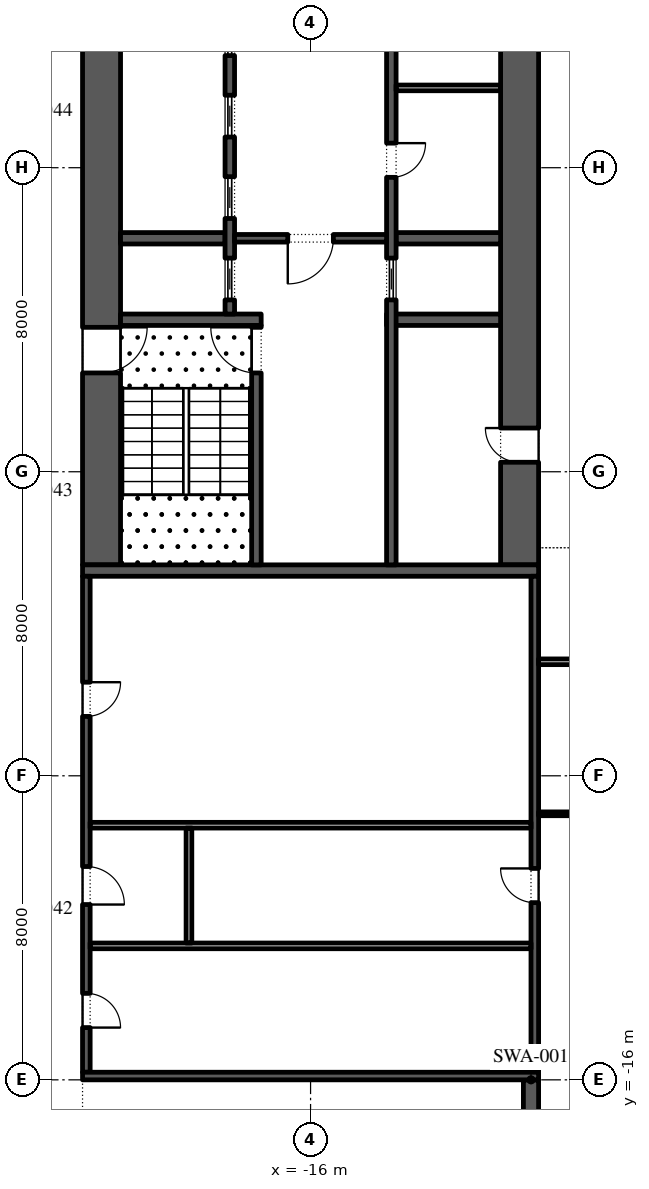
"""IFC4 building model, lengths in metres.
Left out: names, types, materials, properties, quantities, classifications, styles, units other than length and angle.
Written with IfcOpenShell. Run it as: python <this file> out.ifc"""

import sys

from ifc_helpers import new_model, si_unit, direction, frame, frame_2d, origin, place, context, subcontext, project, spatial, rectangle, extrude, element, fill, save


model = new_model("IFC4")
c1 = context("Model", 3, precision=1e-05, world=origin(), true_north=direction((0.0, 1.0)))
c2 = subcontext(c1, "Body", "Model", "MODEL_VIEW")
j1 = project(units=[si_unit("LENGTHUNIT", "METRE"), si_unit("PLANEANGLEUNIT", "RADIAN")], contexts=[c1])
p1 = place(None, origin())
s1 = spatial("IfcSite", under=j1, at=p1, CompositionType="ELEMENT")
p2 = place(p1, origin())
s2 = spatial("IfcBuilding", under=s1, at=p2, CompositionType="ELEMENT")
p3 = place(p2, frame((0.0, 0.0, 14.0)))
s3 = spatial("IfcBuildingStorey", under=s2, at=p3, CompositionType="ELEMENT", Elevation=14.0)
p4 = place(p3, frame((-10.2, -31.0, 0.0), z_axis=(0.0, 0.0, 1.0), x_axis=(0.0, 1.0, 0.0)))
e1 = element("IfcWall", 1, at=p4, inside=s3, PredefinedType="SHEAR", context=c2, shape_type="SweptSolid", body=[
    extrude(rectangle(XDim=15.0, YDim=0.4, at=frame_2d((7.5, 0.0))), origin(), (0.0, 0.0, 1.0), 4.9),
])
p5 = place(p3, frame((-21.5, -2.45, 0.0), z_axis=(0.0, 0.0, 1.0), x_axis=(0.0, 1.0, 0.0)))
e2 = element("IfcWall", 2, at=p5, inside=s3, PredefinedType="SHEAR", context=c2, shape_type="SweptSolid", body=[
    extrude(rectangle(XDim=27.9, YDim=1.0, at=frame_2d((13.95, 0.0))), origin(), (0.0, 0.0, 1.0), 4.9),
])
p6 = place(p5, frame((5.05, 0.0, 0.0)))
e3 = element("IfcOpeningElement", 3, at=p6, cuts=e2, PredefinedType="OPENING", context=c2, shape_type="SweptSolid", body=[
    extrude(rectangle(XDim=1.2, YDim=2.1, at=frame_2d((0.6, 1.05))), frame((0.0, 0.51, 0.0), z_axis=(0.0, -1.0, 0.0), x_axis=(1.0, 0.0, 0.0)), (0.0, 0.0, 1.0), 1.02),
])
p7 = place(p5, frame((21.65, 0.0, 0.0)))
e4 = element("IfcOpeningElement", 4, at=p7, cuts=e2, PredefinedType="OPENING", context=c2, shape_type="SweptSolid", body=[
    extrude(rectangle(XDim=1.2, YDim=2.1, at=frame_2d((0.6, 1.05))), frame((0.0, 0.51, 0.0), z_axis=(0.0, -1.0, 0.0), x_axis=(1.0, 0.0, 0.0)), (0.0, 0.0, 1.0), 1.02),
])
p8 = place(p3, frame((-10.5, -2.45, 0.0), z_axis=(0.0, 0.0, 1.0), x_axis=(0.0, 1.0, 0.0)))
e5 = element("IfcWall", 5, at=p8, inside=s3, PredefinedType="SHEAR", context=c2, shape_type="SweptSolid", body=[
    extrude(rectangle(XDim=27.9, YDim=1.0, at=frame_2d((13.95, 0.0))), origin(), (0.0, 0.0, 1.0), 4.9),
])
p9 = place(p8, frame((23.65, 0.0, 0.0)))
e6 = element("IfcOpeningElement", 6, at=p9, cuts=e5, PredefinedType="OPENING", context=c2, shape_type="SweptSolid", body=[
    extrude(rectangle(XDim=2.4, YDim=2.1, at=frame_2d((1.2, 1.05))), frame((0.0, 0.51, 0.0), z_axis=(0.0, -1.0, 0.0), x_axis=(1.0, 0.0, 0.0)), (0.0, 0.0, 1.0), 1.02),
])
p10 = place(p8, frame((2.7, 0.0, 0.0)))
e7 = element("IfcOpeningElement", 7, at=p10, cuts=e5, PredefinedType="OPENING", context=c2, shape_type="SweptSolid", body=[
    extrude(rectangle(XDim=0.9, YDim=2.1, at=frame_2d((0.45, 1.05))), frame((0.0, 0.51, 0.0), z_axis=(0.0, -1.0, 0.0), x_axis=(1.0, 0.0, 0.0)), (0.0, 0.0, 1.0), 1.02),
])
p11 = place(p3, frame((-22.0, -2.6, 0.0), z_axis=(0.0, 0.0, 1.0), x_axis=(1.0, 0.0, 0.0)))
e8 = element("IfcWall", 8, at=p11, inside=s3, PredefinedType="SHEAR", context=c2, shape_type="SweptSolid", body=[
    extrude(rectangle(XDim=12.0, YDim=0.3, at=frame_2d((6.0, 0.0))), origin(), (0.0, 0.0, 1.0), 4.9),
])
p12 = place(p3, frame((-21.0, 4.0, 0.0), z_axis=(0.0, 0.0, 1.0), x_axis=(1.0, 0.0, 0.0)))
e9 = element("IfcWall", 9, at=p12, inside=s3, PredefinedType="SHEAR", context=c2, shape_type="SweptSolid", body=[
    extrude(rectangle(XDim=3.7, YDim=0.3, at=frame_2d((1.85, 0.0))), origin(), (0.0, 0.0, 1.0), 4.9),
])
p13 = place(p3, frame((-17.425, -2.45, 0.0), z_axis=(0.0, 0.0, 1.0), x_axis=(0.0, 1.0, 0.0)))
e10 = element("IfcWall", 10, at=p13, inside=s3, PredefinedType="SHEAR", context=c2, shape_type="SweptSolid", body=[
    extrude(rectangle(XDim=6.3, YDim=0.25, at=frame_2d((3.15, 0.0))), origin(), (0.0, 0.0, 1.0), 4.9),
])
p14 = place(p13, frame((5.05, 0.0, 0.0)))
e11 = element("IfcOpeningElement", 11, at=p14, cuts=e10, PredefinedType="OPENING", context=c2, shape_type="SweptSolid", body=[
    extrude(rectangle(XDim=1.2, YDim=2.1, at=frame_2d((0.6, 1.05))), frame((0.0, 0.135, 0.0), z_axis=(0.0, -1.0, 0.0), x_axis=(1.0, 0.0, 0.0)), (0.0, 0.0, 1.0), 0.27),
])
p15 = place(p3, frame((-21.0, 6.143, 0.0), z_axis=(0.0, 0.0, 1.0), x_axis=(1.0, 0.0, 0.0)))
e12 = element("IfcWall", 12, at=p15, inside=s3, PredefinedType="SHEAR", context=c2, shape_type="SweptSolid", body=[
    extrude(rectangle(XDim=2.75, YDim=0.3, at=frame_2d((1.375, 0.0))), origin(), (0.0, 0.0, 1.0), 4.9),
])
p16 = place(p3, frame((-18.125, 4.15, 0.0), z_axis=(0.0, 0.0, 1.0), x_axis=(0.0, 1.0, 0.0)))
e13 = element("IfcWall", 13, at=p16, inside=s3, PredefinedType="SHEAR", context=c2, shape_type="SweptSolid", body=[
    extrude(rectangle(XDim=14.7, YDim=0.25, at=frame_2d((7.35, 0.0))), origin(), (0.0, 0.0, 1.0), 4.9),
])
p17 = place(p16, frame((0.371, 0.0, 0.0)))
e14 = element("IfcOpeningElement", 14, at=p17, cuts=e13, PredefinedType="OPENING", context=c2, shape_type="SweptSolid", body=[
    extrude(rectangle(XDim=1.1, YDim=2.1, at=frame_2d((0.55, 1.05))), frame((0.0, 0.135, 0.0), z_axis=(0.0, -1.0, 0.0), x_axis=(1.0, 0.0, 0.0)), (0.0, 0.0, 1.0), 0.27),
])
p18 = place(p16, frame((2.514, 0.0, 0.0)))
e15 = element("IfcOpeningElement", 15, at=p18, cuts=e13, PredefinedType="OPENING", context=c2, shape_type="SweptSolid", body=[
    extrude(rectangle(XDim=1.1, YDim=2.1, at=frame_2d((0.55, 1.05))), frame((0.0, 0.135, 0.0), z_axis=(0.0, -1.0, 0.0), x_axis=(1.0, 0.0, 0.0)), (0.0, 0.0, 1.0), 0.27),
])
p19 = place(p16, frame((4.657, 0.0, 0.0)))
e16 = element("IfcOpeningElement", 16, at=p19, cuts=e13, PredefinedType="OPENING", context=c2, shape_type="SweptSolid", body=[
    extrude(rectangle(XDim=1.1, YDim=2.1, at=frame_2d((0.55, 1.05))), frame((0.0, 0.135, 0.0), z_axis=(0.0, -1.0, 0.0), x_axis=(1.0, 0.0, 0.0)), (0.0, 0.0, 1.0), 0.27),
])
p20 = place(p16, frame((6.8, 0.0, 0.0)))
e17 = element("IfcOpeningElement", 17, at=p20, cuts=e13, PredefinedType="OPENING", context=c2, shape_type="SweptSolid", body=[
    extrude(rectangle(XDim=1.1, YDim=2.1, at=frame_2d((0.55, 1.05))), frame((0.0, 0.135, 0.0), z_axis=(0.0, -1.0, 0.0), x_axis=(1.0, 0.0, 0.0)), (0.0, 0.0, 1.0), 0.27),
])
p21 = place(p16, frame((8.943, 0.0, 0.0)))
e18 = element("IfcOpeningElement", 18, at=p21, cuts=e13, PredefinedType="OPENING", context=c2, shape_type="SweptSolid", body=[
    extrude(rectangle(XDim=1.1, YDim=2.1, at=frame_2d((0.55, 1.05))), frame((0.0, 0.135, 0.0), z_axis=(0.0, -1.0, 0.0), x_axis=(1.0, 0.0, 0.0)), (0.0, 0.0, 1.0), 0.27),
])
p22 = place(p16, frame((11.086, 0.0, 0.0)))
e19 = element("IfcOpeningElement", 19, at=p22, cuts=e13, PredefinedType="OPENING", context=c2, shape_type="SweptSolid", body=[
    extrude(rectangle(XDim=1.1, YDim=2.1, at=frame_2d((0.55, 1.05))), frame((0.0, 0.135, 0.0), z_axis=(0.0, -1.0, 0.0), x_axis=(1.0, 0.0, 0.0)), (0.0, 0.0, 1.0), 0.27),
])
p23 = place(p16, frame((13.229, 0.0, 0.0)))
e20 = element("IfcOpeningElement", 20, at=p23, cuts=e13, PredefinedType="OPENING", context=c2, shape_type="SweptSolid", body=[
    extrude(rectangle(XDim=1.1, YDim=2.1, at=frame_2d((0.55, 1.05))), frame((0.0, 0.135, 0.0), z_axis=(0.0, -1.0, 0.0), x_axis=(1.0, 0.0, 0.0)), (0.0, 0.0, 1.0), 0.27),
])
p24 = place(p3, frame((-14.0, 4.0, 0.0), z_axis=(0.0, 0.0, 1.0), x_axis=(1.0, 0.0, 0.0)))
e21 = element("IfcWall", 21, at=p24, inside=s3, PredefinedType="SHEAR", context=c2, shape_type="SweptSolid", body=[
    extrude(rectangle(XDim=3.0, YDim=0.3, at=frame_2d((1.5, 0.0))), origin(), (0.0, 0.0, 1.0), 4.9),
])
p25 = place(p3, frame((-13.75, 6.143, 0.0), z_axis=(0.0, 0.0, 1.0), x_axis=(1.0, 0.0, 0.0)))
e22 = element("IfcWall", 22, at=p25, inside=s3, PredefinedType="SHEAR", context=c2, shape_type="SweptSolid", body=[
    extrude(rectangle(XDim=2.75, YDim=0.3, at=frame_2d((1.375, 0.0))), origin(), (0.0, 0.0, 1.0), 4.9),
])
p26 = place(p3, frame((-13.875, -2.45, 0.0), z_axis=(0.0, 0.0, 1.0), x_axis=(0.0, 1.0, 0.0)))
e23 = element("IfcWall", 23, at=p26, inside=s3, PredefinedType="SHEAR", context=c2, shape_type="SweptSolid", body=[
    extrude(rectangle(XDim=21.3, YDim=0.25, at=frame_2d((10.65, 0.0))), origin(), (0.0, 0.0, 1.0), 4.9),
])
p27 = place(p26, frame((10.196, 0.0, 0.0)))
e24 = element("IfcOpeningElement", 24, at=p27, cuts=e23, PredefinedType="OPENING", context=c2, shape_type="SweptSolid", body=[
    extrude(rectangle(XDim=0.9, YDim=2.1, at=frame_2d((0.45, 1.05))), frame((0.0, 0.135, 0.0), z_axis=(0.0, -1.0, 0.0), x_axis=(1.0, 0.0, 0.0)), (0.0, 0.0, 1.0), 0.27),
])
p28 = place(p26, frame((16.475, 0.0, 0.0)))
e25 = element("IfcOpeningElement", 25, at=p28, cuts=e23, PredefinedType="OPENING", context=c2, shape_type="SweptSolid", body=[
    extrude(rectangle(XDim=0.9, YDim=2.1, at=frame_2d((0.45, 1.05))), frame((0.0, 0.135, 0.0), z_axis=(0.0, -1.0, 0.0), x_axis=(1.0, 0.0, 0.0)), (0.0, 0.0, 1.0), 0.27),
])
p29 = place(p26, frame((6.971, 0.0, 0.0)))
e26 = element("IfcOpeningElement", 26, at=p29, cuts=e23, PredefinedType="OPENING", context=c2, shape_type="SweptSolid", body=[
    extrude(rectangle(XDim=1.1, YDim=2.1, at=frame_2d((0.55, 1.05))), frame((0.0, 0.135, 0.0), z_axis=(0.0, -1.0, 0.0), x_axis=(1.0, 0.0, 0.0)), (0.0, 0.0, 1.0), 0.27),
])
p30 = place(p3, frame((-13.75, 10.1, 0.0), z_axis=(0.0, 0.0, 1.0), x_axis=(1.0, 0.0, 0.0)))
e27 = element("IfcWall", 27, at=p30, inside=s3, PredefinedType="PARTITIONING", context=c2, shape_type="SweptSolid", body=[
    extrude(rectangle(XDim=2.75, YDim=0.15, at=frame_2d((1.375, 0.0))), origin(), (0.0, 0.0, 1.0), 4.9),
])
p31 = place(p3, frame((-18.0, 6.143, 0.0), z_axis=(0.0, 0.0, 1.0), x_axis=(1.0, 0.0, 0.0)))
e28 = element("IfcWall", 28, at=p31, inside=s3, PredefinedType="SHEAR", context=c2, shape_type="SweptSolid", body=[
    extrude(rectangle(XDim=4.0, YDim=0.2, at=frame_2d((2.0, 0.0))), origin(), (0.0, 0.0, 1.0), 4.9),
])
p32 = place(p31, frame((1.4, 0.0, 0.0)))
e29 = element("IfcOpeningElement", 29, at=p32, cuts=e28, PredefinedType="OPENING", context=c2, shape_type="SweptSolid", body=[
    extrude(rectangle(XDim=1.2, YDim=2.1, at=frame_2d((0.6, 1.05))), frame((0.0, 0.11, 0.0), z_axis=(0.0, -1.0, 0.0), x_axis=(1.0, 0.0, 0.0)), (0.0, 0.0, 1.0), 0.22),
])
p33 = place(p3, frame((-21.9, -15.8, 0.0), z_axis=(0.0, 0.0, 1.0), x_axis=(0.0, 1.0, 0.0)))
e30 = element("IfcWall", 30, at=p33, inside=s3, PredefinedType="SHEAR", context=c2, shape_type="SweptSolid", body=[
    extrude(rectangle(XDim=13.05, YDim=0.2, at=frame_2d((6.525, 0.0))), origin(), (0.0, 0.0, 1.0), 4.9),
])
p34 = place(p33, frame((1.175, 0.0, 0.0)))
e31 = element("IfcOpeningElement", 31, at=p34, cuts=e30, PredefinedType="OPENING", context=c2, shape_type="SweptSolid", body=[
    extrude(rectangle(XDim=0.9, YDim=2.1, at=frame_2d((0.45, 1.05))), frame((0.0, 0.11, 0.0), z_axis=(0.0, -1.0, 0.0), x_axis=(1.0, 0.0, 0.0)), (0.0, 0.0, 1.0), 0.22),
])
p35 = place(p33, frame((4.413, 0.0, 0.0)))
e32 = element("IfcOpeningElement", 32, at=p35, cuts=e30, PredefinedType="OPENING", context=c2, shape_type="SweptSolid", body=[
    extrude(rectangle(XDim=1.0, YDim=2.1, at=frame_2d((0.5, 1.05))), frame((0.0, 0.11, 0.0), z_axis=(0.0, -1.0, 0.0), x_axis=(1.0, 0.0, 0.0)), (0.0, 0.0, 1.0), 0.22),
])
p36 = place(p33, frame((9.363, 0.0, 0.0)))
e33 = element("IfcOpeningElement", 33, at=p36, cuts=e30, PredefinedType="OPENING", context=c2, shape_type="SweptSolid", body=[
    extrude(rectangle(XDim=0.9, YDim=2.1, at=frame_2d((0.45, 1.05))), frame((0.0, 0.11, 0.0), z_axis=(0.0, -1.0, 0.0), x_axis=(1.0, 0.0, 0.0)), (0.0, 0.0, 1.0), 0.22),
])
p37 = place(p3, frame((-10.1, -15.8, 0.0), z_axis=(0.0, 0.0, 1.0), x_axis=(0.0, 1.0, 0.0)))
e34 = element("IfcWall", 34, at=p37, inside=s3, PredefinedType="SHEAR", context=c2, shape_type="SweptSolid", body=[
    extrude(rectangle(XDim=13.05, YDim=0.2, at=frame_2d((6.525, 0.0))), origin(), (0.0, 0.0, 1.0), 4.9),
])
p38 = place(p37, frame((4.462, 0.0, 0.0)))
e35 = element("IfcOpeningElement", 35, at=p38, cuts=e34, PredefinedType="OPENING", context=c2, shape_type="SweptSolid", body=[
    extrude(rectangle(XDim=0.9, YDim=2.1, at=frame_2d((0.45, 1.05))), frame((0.0, 0.11, 0.0), z_axis=(0.0, -1.0, 0.0), x_axis=(1.0, 0.0, 0.0)), (0.0, 0.0, 1.0), 0.22),
])
p39 = place(p3, frame((-22.0, -15.9, 0.0), z_axis=(0.0, 0.0, 1.0), x_axis=(1.0, 0.0, 0.0)))
e36 = element("IfcWall", 36, at=p39, inside=s3, PredefinedType="SHEAR", context=c2, shape_type="SweptSolid", body=[
    extrude(rectangle(XDim=12.0, YDim=0.2, at=frame_2d((6.0, 0.0))), origin(), (0.0, 0.0, 1.0), 4.9),
])
for number, where, z_axis, x_axis in (
    (37, (-21.8, -9.3, 0.0), (0.0, 0.0, 1.0), (1.0, 0.0, 0.0)),
    (38, (-21.8, -12.475, 0.0), (0.0, 0.0, 1.0), (1.0, 0.0, 0.0)),
):
    element("IfcWall", number, at=place(p3, frame(where, z_axis=z_axis, x_axis=x_axis)), inside=s3, PredefinedType="PARTITIONING", context=c2, shape_type="SweptSolid", body=[
        extrude(rectangle(XDim=11.6, YDim=0.15, at=frame_2d((5.8, 0.0))), origin(), (0.0, 0.0, 1.0), 4.9),
    ])
p40 = place(p3, frame((-19.2, -12.4, 0.0), z_axis=(0.0, 0.0, 1.0), x_axis=(0.0, 1.0, 0.0)))
e39 = element("IfcWall", 39, at=p40, inside=s3, PredefinedType="PARTITIONING", context=c2, shape_type="SweptSolid", body=[
    extrude(rectangle(XDim=3.025, YDim=0.15, at=frame_2d((1.512, 0.0))), origin(), (0.0, 0.0, 1.0), 4.9),
])
p41 = place(p3, frame((-10.0, -9.0, 0.0), z_axis=(0.0, 0.0, 1.0), x_axis=(1.0, 0.0, 0.0)))
e40 = element("IfcWall", 40, at=p41, inside=s3, PredefinedType="PARTITIONING", context=c2, shape_type="SweptSolid", body=[
    extrude(rectangle(XDim=7.925, YDim=0.1, at=frame_2d((3.962, 0.0))), origin(), (0.0, 0.0, 1.0), 4.9),
])
p42 = place(p3, frame((-10.0, -5.0, 0.0), z_axis=(0.0, 0.0, 1.0), x_axis=(1.0, 0.0, 0.0)))
e41 = element("IfcWall", 41, at=p42, inside=s3, PredefinedType="PARTITIONING", context=c2, shape_type="SweptSolid", body=[
    extrude(rectangle(XDim=7.925, YDim=0.15, at=frame_2d((3.962, 0.0))), origin(), (0.0, 0.0, 1.0), 4.9),
])
p43 = place(p42, frame((3.462, 0.0, 0.0)))
e42 = element("IfcOpeningElement", 42, at=p43, cuts=e41, PredefinedType="OPENING", context=c2, shape_type="SweptSolid", body=[
    extrude(rectangle(XDim=1.0, YDim=2.1, at=frame_2d((0.5, 1.05))), frame((0.0, 0.085, 0.0), z_axis=(0.0, -1.0, 0.0), x_axis=(1.0, 0.0, 0.0)), (0.0, 0.0, 1.0), 0.17),
])
p44 = place(p17, origin())
e43 = element("IfcDoor", 43, at=p44, inside=s3, OperationType="SLIDING_TO_LEFT", PredefinedType="DOOR", context=c2, shape_type="SweptSolid", body=[
    extrude(rectangle(XDim=1.1, YDim=2.1, at=frame_2d((0.55, 1.05))), frame((0.0, 0.025, 0.0), z_axis=(0.0, -1.0, 0.0), x_axis=(1.0, 0.0, 0.0)), (0.0, 0.0, 1.0), 0.05),
])
fill(e14, e43)
p45 = place(p18, origin())
e44 = element("IfcDoor", 44, at=p45, inside=s3, OperationType="SLIDING_TO_LEFT", PredefinedType="DOOR", context=c2, shape_type="SweptSolid", body=[
    extrude(rectangle(XDim=1.1, YDim=2.1, at=frame_2d((0.55, 1.05))), frame((0.0, 0.025, 0.0), z_axis=(0.0, -1.0, 0.0), x_axis=(1.0, 0.0, 0.0)), (0.0, 0.0, 1.0), 0.05),
])
fill(e15, e44)
p46 = place(p19, origin())
e45 = element("IfcDoor", 45, at=p46, inside=s3, OperationType="SLIDING_TO_LEFT", PredefinedType="DOOR", context=c2, shape_type="SweptSolid", body=[
    extrude(rectangle(XDim=1.1, YDim=2.1, at=frame_2d((0.55, 1.05))), frame((0.0, 0.025, 0.0), z_axis=(0.0, -1.0, 0.0), x_axis=(1.0, 0.0, 0.0)), (0.0, 0.0, 1.0), 0.05),
])
fill(e16, e45)
p47 = place(p20, origin())
e46 = element("IfcDoor", 46, at=p47, inside=s3, OperationType="SLIDING_TO_LEFT", PredefinedType="DOOR", context=c2, shape_type="SweptSolid", body=[
    extrude(rectangle(XDim=1.1, YDim=2.1, at=frame_2d((0.55, 1.05))), frame((0.0, 0.025, 0.0), z_axis=(0.0, -1.0, 0.0), x_axis=(1.0, 0.0, 0.0)), (0.0, 0.0, 1.0), 0.05),
])
fill(e17, e46)
p48 = place(p27, frame((0.9, -0.2, 0.0), z_axis=(0.0, 0.0, 1.0), x_axis=(-1.0, 0.0, 0.0)))
e47 = element("IfcDoor", 47, at=p48, inside=s3, OperationType="SINGLE_SWING_RIGHT", PredefinedType="DOOR", context=c2, shape_type="SweptSolid", body=[
    extrude(rectangle(XDim=0.9, YDim=2.1, at=frame_2d((0.45, 1.05))), frame((0.0, -0.075, 0.0), z_axis=(0.0, -1.0, 0.0), x_axis=(1.0, 0.0, 0.0)), (0.0, 0.0, 1.0), 0.05),
])
fill(e24, e47)
p49 = place(p29, origin())
e48 = element("IfcDoor", 48, at=p49, inside=s3, OperationType="SLIDING_TO_LEFT", PredefinedType="DOOR", context=c2, shape_type="SweptSolid", body=[
    extrude(rectangle(XDim=1.1, YDim=2.1, at=frame_2d((0.55, 1.05))), frame((0.0, 0.025, 0.0), z_axis=(0.0, -1.0, 0.0), x_axis=(1.0, 0.0, 0.0)), (0.0, 0.0, 1.0), 0.05),
])
fill(e26, e48)
p50 = place(p32, frame((1.2, 0.0, 0.0), z_axis=(0.0, 0.0, 1.0), x_axis=(-1.0, 0.0, 0.0)))
e49 = element("IfcDoor", 49, at=p50, inside=s3, OperationType="SINGLE_SWING_LEFT", PredefinedType="DOOR", context=c2, shape_type="SweptSolid", body=[
    extrude(rectangle(XDim=1.2, YDim=2.1, at=frame_2d((0.6, 1.05))), frame((0.0, 0.025, 0.0), z_axis=(0.0, -1.0, 0.0), x_axis=(1.0, 0.0, 0.0)), (0.0, 0.0, 1.0), 0.05),
])
fill(e29, e49)
p51 = place(p14, origin())
e50 = element("IfcDoor", 50, at=p51, inside=s3, OperationType="SINGLE_SWING_LEFT", PredefinedType="DOOR", context=c2, shape_type="SweptSolid", body=[
    extrude(rectangle(XDim=1.2, YDim=2.1, at=frame_2d((0.6, 1.05))), frame((0.0, 0.025, 0.0), z_axis=(0.0, -1.0, 0.0), x_axis=(1.0, 0.0, 0.0)), (0.0, 0.0, 1.0), 0.05),
])
fill(e11, e50)
p52 = place(p6, frame((1.2, 0.0, 0.0), z_axis=(0.0, 0.0, 1.0), x_axis=(-1.0, 0.0, 0.0)))
e51 = element("IfcDoor", 51, at=p52, inside=s3, OperationType="SINGLE_SWING_RIGHT", PredefinedType="DOOR", context=c2, shape_type="SweptSolid", body=[
    extrude(rectangle(XDim=1.2, YDim=2.1, at=frame_2d((0.6, 1.05))), frame((0.0, 0.025, 0.0), z_axis=(0.0, -1.0, 0.0), x_axis=(1.0, 0.0, 0.0)), (0.0, 0.0, 1.0), 0.05),
])
fill(e3, e51)
p53 = place(p10, origin())
e52 = element("IfcDoor", 52, at=p53, inside=s3, OperationType="SINGLE_SWING_LEFT", PredefinedType="DOOR", context=c2, shape_type="SweptSolid", body=[
    extrude(rectangle(XDim=0.9, YDim=2.1, at=frame_2d((0.45, 1.05))), frame((0.0, 0.5, 0.0), z_axis=(0.0, -1.0, 0.0), x_axis=(1.0, 0.0, 0.0)), (0.0, 0.0, 1.0), 0.05),
])
fill(e7, e52)
p54 = place(p34, frame((0.9, -0.15, 0.0), z_axis=(0.0, 0.0, 1.0), x_axis=(-1.0, 0.0, 0.0)))
e53 = element("IfcDoor", 53, at=p54, inside=s3, OperationType="SINGLE_SWING_LEFT", PredefinedType="DOOR", context=c2, shape_type="SweptSolid", body=[
    extrude(rectangle(XDim=0.9, YDim=2.1, at=frame_2d((0.45, 1.05))), frame((0.0, -0.05, 0.0), z_axis=(0.0, -1.0, 0.0), x_axis=(1.0, 0.0, 0.0)), (0.0, 0.0, 1.0), 0.05),
])
fill(e31, e53)
p55 = place(p35, frame((1.0, -0.15, 0.0), z_axis=(0.0, 0.0, 1.0), x_axis=(-1.0, 0.0, 0.0)))
e54 = element("IfcDoor", 54, at=p55, inside=s3, OperationType="SINGLE_SWING_LEFT", PredefinedType="DOOR", context=c2, shape_type="SweptSolid", body=[
    extrude(rectangle(XDim=1.0, YDim=2.1, at=frame_2d((0.5, 1.05))), frame((0.0, -0.05, 0.0), z_axis=(0.0, -1.0, 0.0), x_axis=(1.0, 0.0, 0.0)), (0.0, 0.0, 1.0), 0.05),
])
fill(e32, e54)
p56 = place(p38, origin())
e55 = element("IfcDoor", 55, at=p56, inside=s3, OperationType="SINGLE_SWING_LEFT", PredefinedType="DOOR", context=c2, shape_type="SweptSolid", body=[
    extrude(rectangle(XDim=0.9, YDim=2.1, at=frame_2d((0.45, 1.05))), frame((0.0, 0.1, 0.0), z_axis=(0.0, -1.0, 0.0), x_axis=(1.0, 0.0, 0.0)), (0.0, 0.0, 1.0), 0.05),
])
fill(e35, e55)
p57 = place(p36, frame((0.9, -0.15, 0.0), z_axis=(0.0, 0.0, 1.0), x_axis=(-1.0, 0.0, 0.0)))
e56 = element("IfcDoor", 56, at=p57, inside=s3, OperationType="SINGLE_SWING_RIGHT", PredefinedType="DOOR", context=c2, shape_type="SweptSolid", body=[
    extrude(rectangle(XDim=0.9, YDim=2.1, at=frame_2d((0.45, 1.05))), frame((0.0, -0.05, 0.0), z_axis=(0.0, -1.0, 0.0), x_axis=(1.0, 0.0, 0.0)), (0.0, 0.0, 1.0), 0.05),
])
fill(e33, e56)
save(model, sys.argv[1])
